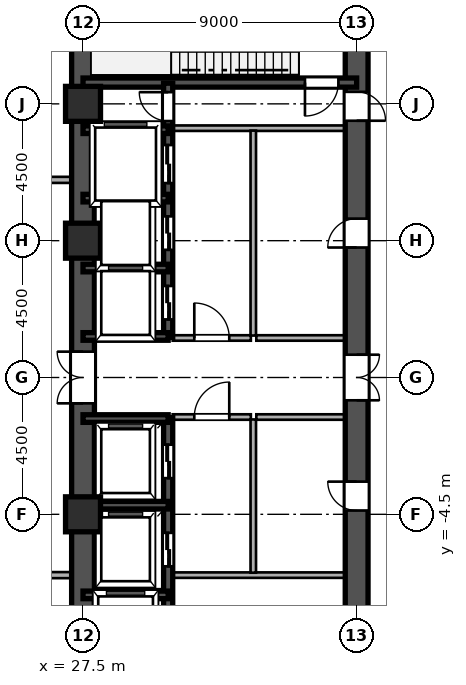
"""IFC4 building model, lengths in metres.
Left out: names, types, materials, properties, quantities, classifications, styles, units other than length and angle.
Written with IfcOpenShell. Run it as: python <this file> out.ifc"""

import sys

from ifc_helpers import new_model, si_unit, direction, frame, frame_2d, origin, origin_2d, place, context, subcontext, project, spatial, rectangle, hollow_rectangle, extrude, source, transform, mapped, element, fill, save


model = new_model("IFC4")
c1 = context("Model", 3, precision=1e-05, world=origin(), true_north=direction((0.0, 1.0)))
c2 = subcontext(c1, "Body", "Model", "MODEL_VIEW")
j1 = project(units=[si_unit("LENGTHUNIT", "METRE"), si_unit("PLANEANGLEUNIT", "RADIAN")], contexts=[c1])
p1 = place(None, origin())
s1 = spatial("IfcSite", under=j1, at=p1, CompositionType="ELEMENT")
p2 = place(p1, origin())
s2 = spatial("IfcBuilding", under=s1, at=p2, CompositionType="ELEMENT")
p3 = place(p2, origin())
s3 = spatial("IfcBuildingStorey", under=s2, at=p3, CompositionType="ELEMENT", Elevation=0.0)
m1 = source(origin(), c2, "Body", "SweptSolid", [
    extrude(hollow_rectangle(XDim=1.15, YDim=1.15, WallThickness=0.048, at=origin_2d()), origin(), (0.0, 0.0, 1.0), 5.4),
])
for number, where, z_axis, x_axis in (
    (1, (27.5, -4.5, 0.0), (0.0, 0.0, 1.0), (1.0, 0.0, 0.0)),
    (2, (27.5, 4.5, 0.0), (0.0, 0.0, 1.0), (1.0, 0.0, 0.0)),
    (3, (27.5, 9.0, 0.0), (0.0, 0.0, 1.0), (1.0, 0.0, 0.0)),
):
    element("IfcColumn", number, at=place(p3, frame(where, z_axis=z_axis, x_axis=x_axis)), inside=s3, PredefinedType="COLUMN", context=c2, shape_type="MappedRepresentation", body=[
        mapped(m1, transform((0.0, 0.0, 0.0), scale=1.0)),
    ])
for number, where, z_axis, x_axis in (
    (4, (27.5, -13.5, 0.0), (0.0, 0.0, 1.0), (0.0, 1.0, 0.0)),
    (5, (27.5, 1.3, 0.0), (0.0, 0.0, 1.0), (0.0, 1.0, 0.0)),
):
    element("IfcWall", number, at=place(p3, frame(where, z_axis=z_axis, x_axis=x_axis)), inside=s3, PredefinedType="SHEAR", context=c2, shape_type="SweptSolid", body=[
        extrude(rectangle(XDim=12.2, YDim=0.75, at=frame_2d((6.1, 0.0))), origin(), (0.0, 0.0, 1.0), 5.12),
    ])
p4 = place(p3, frame((27.5, -1.3, 0.0), z_axis=(0.0, 0.0, 1.0), x_axis=(0.0, 1.0, 0.0)))
e6 = element("IfcWall", 6, at=p4, inside=s3, PredefinedType="SHEAR", context=c2, shape_type="SweptSolid", body=[
    extrude(rectangle(XDim=2.6, YDim=0.75, at=frame_2d((1.3, 0.0))), origin(), (0.0, 0.0, 1.0), 5.12),
])
p5 = place(p4, frame((0.45, 0.0, 0.0)))
e7 = element("IfcOpeningElement", 7, at=p5, cuts=e6, PredefinedType="OPENING", context=c2, shape_type="SweptSolid", body=[
    extrude(rectangle(XDim=1.7, YDim=2.35, at=frame_2d((0.85, 1.175))), frame((0.0, 0.385, 0.0), z_axis=(0.0, -1.0, 0.0), x_axis=(1.0, 0.0, 0.0)), (0.0, 0.0, 1.0), 0.77),
])
p6 = place(p3, frame((36.5, -13.65, 0.0), z_axis=(0.0, 0.0, 1.0), x_axis=(0.0, 1.0, 0.0)))
e8 = element("IfcWall", 8, at=p6, inside=s3, PredefinedType="SHEAR", context=c2, shape_type="SweptSolid", body=[
    extrude(rectangle(XDim=7.15, YDim=0.75, at=frame_2d((3.575, 0.0))), origin(), (0.0, 0.0, 1.0), 5.12),
])
p7 = place(p6, frame((4.675, 0.0, 0.0)))
e9 = element("IfcOpeningElement", 9, at=p7, cuts=e8, PredefinedType="OPENING", context=c2, shape_type="SweptSolid", body=[
    extrude(rectangle(XDim=1.15, YDim=2.2, at=frame_2d((0.575, 1.1))), frame((0.0, 0.385, 0.0), z_axis=(0.0, -1.0, 0.0), x_axis=(1.0, 0.0, 0.0)), (0.0, 0.0, 1.0), 0.77),
])
p8 = place(p3, frame((36.5, -1.3, 0.0), z_axis=(0.0, 0.0, 1.0), x_axis=(0.0, 1.0, 0.0)))
e10 = element("IfcWall", 10, at=p8, inside=s3, PredefinedType="SHEAR", context=c2, shape_type="SweptSolid", body=[
    extrude(rectangle(XDim=2.6, YDim=0.75, at=frame_2d((1.3, 0.0))), origin(), (0.0, 0.0, 1.0), 5.12),
])
p9 = place(p8, frame((0.55, 0.0, 0.0)))
e11 = element("IfcOpeningElement", 11, at=p9, cuts=e10, PredefinedType="OPENING", context=c2, shape_type="SweptSolid", body=[
    extrude(rectangle(XDim=1.5, YDim=2.3, at=frame_2d((0.75, 1.15))), frame((0.0, 0.385, 0.0), z_axis=(0.0, -1.0, 0.0), x_axis=(1.0, 0.0, 0.0)), (0.0, 0.0, 1.0), 0.77),
])
p10 = place(p3, frame((36.5, 8.2, 0.0), z_axis=(0.0, 0.0, 1.0), x_axis=(0.0, 1.0, 0.0)))
e12 = element("IfcWall", 12, at=p10, inside=s3, PredefinedType="SHEAR", context=c2, shape_type="SweptSolid", body=[
    extrude(rectangle(XDim=5.45, YDim=0.75, at=frame_2d((2.725, 0.0))), origin(), (0.0, 0.0, 1.0), 5.12),
])
p11 = place(p10, frame((0.245, 0.0, 0.0)))
e13 = element("IfcOpeningElement", 13, at=p11, cuts=e12, PredefinedType="OPENING", context=c2, shape_type="SweptSolid", body=[
    extrude(rectangle(XDim=0.95, YDim=2.15, at=frame_2d((0.475, 1.075))), frame((0.0, 0.385, 0.0), z_axis=(0.0, -1.0, 0.0), x_axis=(1.0, 0.0, 0.0)), (0.0, 0.0, 1.0), 0.77),
])
p12 = place(p3, frame((36.5, -6.5, 0.0), z_axis=(0.0, 0.0, 1.0), x_axis=(0.0, 1.0, 0.0)))
e14 = element("IfcWall", 14, at=p12, inside=s3, PredefinedType="SHEAR", context=c2, shape_type="SweptSolid", body=[
    extrude(rectangle(XDim=5.2, YDim=0.75, at=frame_2d((2.6, 0.0))), origin(), (0.0, 0.0, 1.0), 5.12),
])
p13 = place(p12, frame((2.125, 0.0, 0.0)))
e15 = element("IfcOpeningElement", 15, at=p13, cuts=e14, PredefinedType="OPENING", context=c2, shape_type="SweptSolid", body=[
    extrude(rectangle(XDim=0.95, YDim=2.15, at=frame_2d((0.475, 1.075))), frame((0.0, 0.385, 0.0), z_axis=(0.0, -1.0, 0.0), x_axis=(1.0, 0.0, 0.0)), (0.0, 0.0, 1.0), 0.77),
])
p14 = place(p3, frame((36.5, 1.3, 0.0), z_axis=(0.0, 0.0, 1.0), x_axis=(0.0, 1.0, 0.0)))
e16 = element("IfcWall", 16, at=p14, inside=s3, PredefinedType="SHEAR", context=c2, shape_type="SweptSolid", body=[
    extrude(rectangle(XDim=6.9, YDim=0.75, at=frame_2d((3.45, 0.0))), origin(), (0.0, 0.0, 1.0), 5.12),
])
p15 = place(p14, frame((2.975, 0.0, 0.0)))
e17 = element("IfcOpeningElement", 17, at=p15, cuts=e16, PredefinedType="OPENING", context=c2, shape_type="SweptSolid", body=[
    extrude(rectangle(XDim=0.95, YDim=2.15, at=frame_2d((0.475, 1.075))), frame((0.0, 0.385, 0.0), z_axis=(0.0, -1.0, 0.0), x_axis=(1.0, 0.0, 0.0)), (0.0, 0.0, 1.0), 0.77),
])
p16 = place(p3, frame((27.5, 9.7, 0.0), z_axis=(0.0, 0.0, 1.0), x_axis=(1.0, 0.0, 0.0)))
e18 = element("IfcWall", 18, at=p16, inside=s3, PredefinedType="SHEAR", context=c2, shape_type="SweptSolid", body=[
    extrude(rectangle(XDim=9.0, YDim=0.3, at=frame_2d((4.5, 0.0))), origin(), (0.0, 0.0, 1.0), 5.12),
])
p17 = place(p16, frame((7.3, 0.0, 0.0)))
e19 = element("IfcOpeningElement", 19, at=p17, cuts=e18, PredefinedType="OPENING", context=c2, shape_type="SweptSolid", body=[
    extrude(rectangle(XDim=1.1, YDim=2.2, at=frame_2d((0.55, 1.1))), frame((0.0, 0.16, 0.0), z_axis=(0.0, -1.0, 0.0), x_axis=(1.0, 0.0, 0.0)), (0.0, 0.0, 1.0), 0.32),
])
for number, where, z_axis, x_axis in (
    (20, (27.5, -7.15, 0.0), (0.0, 0.0, 1.0), (1.0, 0.0, 0.0)),
    (21, (27.5, -4.2, 0.0), (0.0, 0.0, 1.0), (1.0, 0.0, 0.0)),
    (22, (27.5, -1.35, 0.0), (0.0, 0.0, 1.0), (1.0, 0.0, 0.0)),
    (23, (27.5, 1.35, 0.0), (0.0, 0.0, 1.0), (1.0, 0.0, 0.0)),
    (24, (27.5, 3.6, 0.0), (0.0, 0.0, 1.0), (1.0, 0.0, 0.0)),
    (25, (27.5, 5.9, 0.0), (0.0, 0.0, 1.0), (1.0, 0.0, 0.0)),
    (26, (27.5, 8.15, 0.0), (0.0, 0.0, 1.0), (1.0, 0.0, 0.0)),
):
    element("IfcWall", number, at=place(p3, frame(where, z_axis=z_axis, x_axis=x_axis)), inside=s3, PredefinedType="SHEAR", context=c2, shape_type="SweptSolid", body=[
        extrude(rectangle(XDim=2.8, YDim=0.25, at=frame_2d((1.4, 0.0))), origin(), (0.0, 0.0, 1.0), 5.12),
    ])
p18 = place(p3, frame((30.3, -9.68, 0.0), z_axis=(0.0, 0.0, 1.0), x_axis=(0.0, 1.0, 0.0)))
e27 = element("IfcWall", 27, at=p18, inside=s3, PredefinedType="SHEAR", context=c2, shape_type="SweptSolid", body=[
    extrude(rectangle(XDim=2.56, YDim=0.3, at=frame_2d((1.28, 0.0))), origin(), (0.0, 0.0, 1.0), 5.12),
])
p19 = place(p18, frame((0.68, 0.0, 0.0)))
e28 = element("IfcOpeningElement", 28, at=p19, cuts=e27, PredefinedType="OPENING", context=c2, shape_type="SweptSolid", body=[
    extrude(rectangle(XDim=1.2, YDim=2.25, at=frame_2d((0.6, 1.125))), frame((0.0, 0.16, 0.0), z_axis=(0.0, -1.0, 0.0), x_axis=(1.0, 0.0, 0.0)), (0.0, 0.0, 1.0), 0.32),
])
p20 = place(p3, frame((30.3, -7.12, 0.0), z_axis=(0.0, 0.0, 1.0), x_axis=(0.0, 1.0, 0.0)))
e29 = element("IfcWall", 29, at=p20, inside=s3, PredefinedType="SHEAR", context=c2, shape_type="SweptSolid", body=[
    extrude(rectangle(XDim=2.92, YDim=0.3, at=frame_2d((1.46, 0.0))), origin(), (0.0, 0.0, 1.0), 5.12),
])
p21 = place(p20, frame((0.91, 0.0, 0.0)))
e30 = element("IfcOpeningElement", 30, at=p21, cuts=e29, PredefinedType="OPENING", context=c2, shape_type="SweptSolid", body=[
    extrude(rectangle(XDim=1.1, YDim=2.2, at=frame_2d((0.55, 1.1))), frame((0.0, 0.16, 0.0), z_axis=(0.0, -1.0, 0.0), x_axis=(1.0, 0.0, 0.0)), (0.0, 0.0, 1.0), 0.32),
])
p22 = place(p3, frame((30.3, -4.2, 0.0), z_axis=(0.0, 0.0, 1.0), x_axis=(0.0, 1.0, 0.0)))
e31 = element("IfcWall", 31, at=p22, inside=s3, PredefinedType="SHEAR", context=c2, shape_type="SweptSolid", body=[
    extrude(rectangle(XDim=2.88, YDim=0.3, at=frame_2d((1.44, 0.0))), origin(), (0.0, 0.0, 1.0), 5.12),
])
p23 = place(p22, frame((0.89, 0.0, 0.0)))
e32 = element("IfcOpeningElement", 32, at=p23, cuts=e31, PredefinedType="OPENING", context=c2, shape_type="SweptSolid", body=[
    extrude(rectangle(XDim=1.1, YDim=2.2, at=frame_2d((0.55, 1.1))), frame((0.0, 0.16, 0.0), z_axis=(0.0, -1.0, 0.0), x_axis=(1.0, 0.0, 0.0)), (0.0, 0.0, 1.0), 0.32),
])
p24 = place(p3, frame((30.3, 1.32, 0.0), z_axis=(0.0, 0.0, 1.0), x_axis=(0.0, 1.0, 0.0)))
e33 = element("IfcWall", 33, at=p24, inside=s3, PredefinedType="SHEAR", context=c2, shape_type="SweptSolid", body=[
    extrude(rectangle(XDim=2.28, YDim=0.3, at=frame_2d((1.14, 0.0))), origin(), (0.0, 0.0, 1.0), 5.12),
])
p25 = place(p24, frame((0.59, 0.0, 0.0)))
e34 = element("IfcOpeningElement", 34, at=p25, cuts=e33, PredefinedType="OPENING", context=c2, shape_type="SweptSolid", body=[
    extrude(rectangle(XDim=1.1, YDim=2.2, at=frame_2d((0.55, 1.1))), frame((0.0, 0.16, 0.0), z_axis=(0.0, -1.0, 0.0), x_axis=(1.0, 0.0, 0.0)), (0.0, 0.0, 1.0), 0.32),
])
p26 = place(p3, frame((30.3, 3.6, 0.0), z_axis=(0.0, 0.0, 1.0), x_axis=(0.0, 1.0, 0.0)))
e35 = element("IfcWall", 35, at=p26, inside=s3, PredefinedType="SHEAR", context=c2, shape_type="SweptSolid", body=[
    extrude(rectangle(XDim=2.3, YDim=0.3, at=frame_2d((1.15, 0.0))), origin(), (0.0, 0.0, 1.0), 5.12),
])
p27 = place(p26, frame((0.6, 0.0, 0.0)))
e36 = element("IfcOpeningElement", 36, at=p27, cuts=e35, PredefinedType="OPENING", context=c2, shape_type="SweptSolid", body=[
    extrude(rectangle(XDim=1.1, YDim=2.2, at=frame_2d((0.55, 1.1))), frame((0.0, 0.16, 0.0), z_axis=(0.0, -1.0, 0.0), x_axis=(1.0, 0.0, 0.0)), (0.0, 0.0, 1.0), 0.32),
])
p28 = place(p3, frame((30.3, 5.9, 0.0), z_axis=(0.0, 0.0, 1.0), x_axis=(0.0, 1.0, 0.0)))
e37 = element("IfcWall", 37, at=p28, inside=s3, PredefinedType="SHEAR", context=c2, shape_type="SweptSolid", body=[
    extrude(rectangle(XDim=2.25, YDim=0.3, at=frame_2d((1.125, 0.0))), origin(), (0.0, 0.0, 1.0), 5.12),
])
p29 = place(p28, frame((0.495, 0.0, 0.0)))
e38 = element("IfcOpeningElement", 38, at=p29, cuts=e37, PredefinedType="OPENING", context=c2, shape_type="SweptSolid", body=[
    extrude(rectangle(XDim=1.25, YDim=2.3, at=frame_2d((0.625, 1.15))), frame((0.0, 0.16, 0.0), z_axis=(0.0, -1.0, 0.0), x_axis=(1.0, 0.0, 0.0)), (0.0, 0.0, 1.0), 0.32),
])
p30 = place(p3, frame((30.3, 8.15, 0.0), z_axis=(0.0, 0.0, 1.0), x_axis=(0.0, 1.0, 0.0)))
e39 = element("IfcWall", 39, at=p30, inside=s3, PredefinedType="SHEAR", context=c2, shape_type="SweptSolid", body=[
    extrude(rectangle(XDim=1.53, YDim=0.3, at=frame_2d((0.765, 0.0))), origin(), (0.0, 0.0, 1.0), 5.12),
])
p31 = place(p30, frame((0.285, 0.0, 0.0)))
e40 = element("IfcOpeningElement", 40, at=p31, cuts=e39, PredefinedType="OPENING", context=c2, shape_type="SweptSolid", body=[
    extrude(rectangle(XDim=0.95, YDim=2.15, at=frame_2d((0.475, 1.075))), frame((0.0, 0.16, 0.0), z_axis=(0.0, -1.0, 0.0), x_axis=(1.0, 0.0, 0.0)), (0.0, 0.0, 1.0), 0.32),
])
for number, where, z_axis, x_axis in (
    (41, (30.45, -6.5, 0.0), (0.0, 0.0, 1.0), (1.0, 0.0, 0.0)),
    (42, (30.45, 8.2, 0.0), (0.0, 0.0, 1.0), (1.0, 0.0, 0.0)),
):
    element("IfcWall", number, at=place(p3, frame(where, z_axis=z_axis, x_axis=x_axis)), inside=s3, PredefinedType="PARTITIONING", context=c2, shape_type="SweptSolid", body=[
        extrude(rectangle(XDim=5.7, YDim=0.18, at=frame_2d((2.85, 0.0))), origin(), (0.0, 0.0, 1.0), 5.12),
    ])
p32 = place(p3, frame((33.1, -6.42, 0.0), z_axis=(0.0, 0.0, 1.0), x_axis=(0.0, 1.0, 0.0)))
e43 = element("IfcWall", 43, at=p32, inside=s3, PredefinedType="PARTITIONING", context=c2, shape_type="SweptSolid", body=[
    extrude(rectangle(XDim=5.04, YDim=0.18, at=frame_2d((2.52, 0.0))), origin(), (0.0, 0.0, 1.0), 5.12),
])
p33 = place(p3, frame((33.1, 1.38, 0.0), z_axis=(0.0, 0.0, 1.0), x_axis=(0.0, 1.0, 0.0)))
e44 = element("IfcWall", 44, at=p33, inside=s3, PredefinedType="PARTITIONING", context=c2, shape_type="SweptSolid", body=[
    extrude(rectangle(XDim=6.74, YDim=0.18, at=frame_2d((3.37, 0.0))), origin(), (0.0, 0.0, 1.0), 5.12),
])
p34 = place(p3, frame((30.45, -1.3, 0.0), z_axis=(0.0, 0.0, 1.0), x_axis=(1.0, 0.0, 0.0)))
e45 = element("IfcWall", 45, at=p34, inside=s3, PredefinedType="PARTITIONING", context=c2, shape_type="SweptSolid", body=[
    extrude(rectangle(XDim=2.57, YDim=0.18, at=frame_2d((1.285, 0.0))), origin(), (0.0, 0.0, 1.0), 5.12),
])
p35 = place(p34, frame((0.71, 0.0, 0.0)))
e46 = element("IfcOpeningElement", 46, at=p35, cuts=e45, PredefinedType="OPENING", context=c2, shape_type="SweptSolid", body=[
    extrude(rectangle(XDim=1.15, YDim=2.2, at=frame_2d((0.575, 1.1))), frame((0.0, 0.1, 0.0), z_axis=(0.0, -1.0, 0.0), x_axis=(1.0, 0.0, 0.0)), (0.0, 0.0, 1.0), 0.2),
])
p36 = place(p3, frame((30.45, 1.3, 0.0), z_axis=(0.0, 0.0, 1.0), x_axis=(1.0, 0.0, 0.0)))
e47 = element("IfcWall", 47, at=p36, inside=s3, PredefinedType="PARTITIONING", context=c2, shape_type="SweptSolid", body=[
    extrude(rectangle(XDim=2.57, YDim=0.18, at=frame_2d((1.285, 0.0))), origin(), (0.0, 0.0, 1.0), 5.12),
])
p37 = place(p36, frame((0.71, 0.0, 0.0)))
e48 = element("IfcOpeningElement", 48, at=p37, cuts=e47, PredefinedType="OPENING", context=c2, shape_type="SweptSolid", body=[
    extrude(rectangle(XDim=1.15, YDim=2.2, at=frame_2d((0.575, 1.1))), frame((0.0, 0.1, 0.0), z_axis=(0.0, -1.0, 0.0), x_axis=(1.0, 0.0, 0.0)), (0.0, 0.0, 1.0), 0.2),
])
for number, where, z_axis, x_axis in (
    (49, (33.2, -1.3, 0.0), (0.0, 0.0, 1.0), (1.0, 0.0, 0.0)),
    (50, (33.2, 1.3, 0.0), (0.0, 0.0, 1.0), (1.0, 0.0, 0.0)),
):
    element("IfcWall", number, at=place(p3, frame(where, z_axis=z_axis, x_axis=x_axis)), inside=s3, PredefinedType="PARTITIONING", context=c2, shape_type="SweptSolid", body=[
        extrude(rectangle(XDim=2.95, YDim=0.18, at=frame_2d((1.475, 0.0))), origin(), (0.0, 0.0, 1.0), 5.12),
    ])
p38 = place(p3, frame((-27.12, -6.5, 0.0), z_axis=(0.0, 0.0, 1.0), x_axis=(1.0, 0.0, 0.0)))
e51 = element("IfcWall", 51, at=p38, inside=s3, PredefinedType="PARTITIONING", context=c2, shape_type="SweptSolid", body=[
    extrude(rectangle(XDim=54.24, YDim=0.2, at=frame_2d((27.12, 0.0))), origin(), (0.0, 0.0, 1.0), 5.12),
])
p39 = place(p38, frame((5.145, 0.0, 0.0)))
e52 = element("IfcOpeningElement", 52, at=p39, cuts=e51, PredefinedType="OPENING", context=c2, shape_type="SweptSolid", body=[
    extrude(rectangle(XDim=0.95, YDim=2.15, at=frame_2d((0.475, 1.075))), frame((0.0, 0.11, 0.0), z_axis=(0.0, -1.0, 0.0), x_axis=(1.0, 0.0, 0.0)), (0.0, 0.0, 1.0), 0.22),
])
p40 = place(p38, frame((37.645, 0.0, 0.0)))
e53 = element("IfcOpeningElement", 53, at=p40, cuts=e51, PredefinedType="OPENING", context=c2, shape_type="SweptSolid", body=[
    extrude(rectangle(XDim=0.95, YDim=2.15, at=frame_2d((0.475, 1.075))), frame((0.0, 0.11, 0.0), z_axis=(0.0, -1.0, 0.0), x_axis=(1.0, 0.0, 0.0)), (0.0, 0.0, 1.0), 0.22),
])
p41 = place(p3, frame((-27.12, 6.5, 0.0), z_axis=(0.0, 0.0, 1.0), x_axis=(1.0, 0.0, 0.0)))
e54 = element("IfcWall", 54, at=p41, inside=s3, PredefinedType="PARTITIONING", context=c2, shape_type="SweptSolid", body=[
    extrude(rectangle(XDim=54.24, YDim=0.2, at=frame_2d((27.12, 0.0))), origin(), (0.0, 0.0, 1.0), 5.12),
])
p42 = place(p41, frame((4.045, 0.0, 0.0)))
e55 = element("IfcOpeningElement", 55, at=p42, cuts=e54, PredefinedType="OPENING", context=c2, shape_type="SweptSolid", body=[
    extrude(rectangle(XDim=1.15, YDim=2.2, at=frame_2d((0.575, 1.1))), frame((0.0, 0.11, 0.0), z_axis=(0.0, -1.0, 0.0), x_axis=(1.0, 0.0, 0.0)), (0.0, 0.0, 1.0), 0.22),
])
p43 = place(p41, frame((17.395, 0.0, 0.0)))
e56 = element("IfcOpeningElement", 56, at=p43, cuts=e54, PredefinedType="OPENING", context=c2, shape_type="SweptSolid", body=[
    extrude(rectangle(XDim=0.95, YDim=2.15, at=frame_2d((0.475, 1.075))), frame((0.0, 0.11, 0.0), z_axis=(0.0, -1.0, 0.0), x_axis=(1.0, 0.0, 0.0)), (0.0, 0.0, 1.0), 0.22),
])
p44 = place(p41, frame((47.33, 0.0, 0.0)))
e57 = element("IfcOpeningElement", 57, at=p44, cuts=e54, PredefinedType="OPENING", context=c2, shape_type="SweptSolid", body=[
    extrude(rectangle(XDim=0.88, YDim=2.1, at=frame_2d((0.44, 1.05))), frame((0.0, 0.11, 0.0), z_axis=(0.0, -1.0, 0.0), x_axis=(1.0, 0.0, 0.0)), (0.0, 0.0, 1.0), 0.22),
])
p45 = place(p41, frame((51.68, 0.0, 0.0)))
e58 = element("IfcOpeningElement", 58, at=p45, cuts=e54, PredefinedType="OPENING", context=c2, shape_type="SweptSolid", body=[
    extrude(rectangle(XDim=0.88, YDim=2.1, at=frame_2d((0.44, 1.05))), frame((0.0, 0.11, 0.0), z_axis=(0.0, -1.0, 0.0), x_axis=(1.0, 0.0, 0.0)), (0.0, 0.0, 1.0), 0.22),
])
m2 = source(origin(), c2, "Body", "SweptSolid", [
    extrude(rectangle(XDim=1.7, YDim=2.35, at=frame_2d((0.85, 1.175))), frame((0.0, 0.025, 0.0), z_axis=(0.0, -1.0, 0.0), x_axis=(1.0, 0.0, 0.0)), (0.0, 0.0, 1.0), 0.05),
])
p46 = place(p5, origin())
e59 = element("IfcDoor", 59, at=p46, inside=s3, OperationType="DOUBLE_SWING_LEFT", PredefinedType="DOOR", context=c2, shape_type="MappedRepresentation", body=[
    mapped(m2, transform((0.0, 0.0, 0.0), scale=1.0)),
])
fill(e7, e59)
m3 = source(origin(), c2, "Body", "SweptSolid", [
    extrude(rectangle(XDim=1.5, YDim=2.3, at=frame_2d((0.75, 1.15))), frame((0.0, 0.025, 0.0), z_axis=(0.0, -1.0, 0.0), x_axis=(1.0, 0.0, 0.0)), (0.0, 0.0, 1.0), 0.05),
])
p47 = place(p9, frame((1.5, 0.0, 0.0), z_axis=(0.0, 0.0, 1.0), x_axis=(-1.0, 0.0, 0.0)))
e60 = element("IfcDoor", 60, at=p47, inside=s3, OperationType="DOUBLE_SWING_LEFT", PredefinedType="DOOR", context=c2, shape_type="MappedRepresentation", body=[
    mapped(m3, transform((0.0, 0.0, 0.0), scale=1.0)),
])
fill(e11, e60)
m4 = source(origin(), c2, "Body", "SweptSolid", [
    extrude(rectangle(XDim=0.95, YDim=2.15, at=frame_2d((0.475, 1.075))), frame((0.0, 0.025, 0.0), z_axis=(0.0, -1.0, 0.0), x_axis=(1.0, 0.0, 0.0)), (0.0, 0.0, 1.0), 0.05),
])
p48 = place(p11, frame((0.95, 0.0, 0.0), z_axis=(0.0, 0.0, 1.0), x_axis=(-1.0, 0.0, 0.0)))
e61 = element("IfcDoor", 61, at=p48, inside=s3, OperationType="SINGLE_SWING_LEFT", PredefinedType="DOOR", context=c2, shape_type="MappedRepresentation", body=[
    mapped(m4, transform((0.0, 0.0, 0.0), scale=1.0)),
])
fill(e13, e61)
p49 = place(p13, origin())
e62 = element("IfcDoor", 62, at=p49, inside=s3, OperationType="SINGLE_SWING_RIGHT", PredefinedType="DOOR", context=c2, shape_type="MappedRepresentation", body=[
    mapped(m4, transform((0.0, 0.0, 0.0), scale=1.0)),
])
fill(e15, e62)
p50 = place(p15, origin())
e63 = element("IfcDoor", 63, at=p50, inside=s3, OperationType="SINGLE_SWING_LEFT", PredefinedType="DOOR", context=c2, shape_type="MappedRepresentation", body=[
    mapped(m4, transform((0.0, 0.0, 0.0), scale=1.0)),
])
fill(e17, e63)
m5 = source(origin(), c2, "Body", "SweptSolid", [
    extrude(rectangle(XDim=1.1, YDim=2.2, at=frame_2d((0.55, 1.1))), frame((0.0, 0.025, 0.0), z_axis=(0.0, -1.0, 0.0), x_axis=(1.0, 0.0, 0.0)), (0.0, 0.0, 1.0), 0.05),
])
p51 = place(p17, frame((1.1, 0.0, 0.0), z_axis=(0.0, 0.0, 1.0), x_axis=(-1.0, 0.0, 0.0)))
e64 = element("IfcDoor", 64, at=p51, inside=s3, OperationType="SINGLE_SWING_LEFT", PredefinedType="DOOR", context=c2, shape_type="MappedRepresentation", body=[
    mapped(m5, transform((0.0, 0.0, 0.0), scale=1.0)),
])
fill(e19, e64)
m6 = source(origin(), c2, "Body", "SweptSolid", [
    extrude(rectangle(XDim=1.1, YDim=2.2, at=frame_2d((0.55, 1.1))), frame((0.0, 0.025, 0.0), z_axis=(0.0, -1.0, 0.0), x_axis=(1.0, 0.0, 0.0)), (0.0, 0.0, 1.0), 0.05),
])
p52 = place(p21, origin())
e65 = element("IfcDoor", 65, at=p52, inside=s3, OperationType="DOUBLE_DOOR_SLIDING", PredefinedType="DOOR", context=c2, shape_type="MappedRepresentation", body=[
    mapped(m6, transform((0.0, 0.0, 0.0), scale=1.0)),
])
fill(e30, e65)
p53 = place(p23, origin())
e66 = element("IfcDoor", 66, at=p53, inside=s3, OperationType="DOUBLE_DOOR_SLIDING", PredefinedType="DOOR", context=c2, shape_type="MappedRepresentation", body=[
    mapped(m6, transform((0.0, 0.0, 0.0), scale=1.0)),
])
fill(e32, e66)
p54 = place(p25, origin())
e67 = element("IfcDoor", 67, at=p54, inside=s3, OperationType="DOUBLE_DOOR_SLIDING", PredefinedType="DOOR", context=c2, shape_type="MappedRepresentation", body=[
    mapped(m6, transform((0.0, 0.0, 0.0), scale=1.0)),
])
fill(e34, e67)
p55 = place(p27, origin())
e68 = element("IfcDoor", 68, at=p55, inside=s3, OperationType="DOUBLE_DOOR_SLIDING", PredefinedType="DOOR", context=c2, shape_type="MappedRepresentation", body=[
    mapped(m6, transform((0.0, 0.0, 0.0), scale=1.0)),
])
fill(e36, e68)
m7 = source(origin(), c2, "Body", "SweptSolid", [
    extrude(rectangle(XDim=1.25, YDim=2.3, at=frame_2d((0.625, 1.15))), frame((0.0, 0.025, 0.0), z_axis=(0.0, -1.0, 0.0), x_axis=(1.0, 0.0, 0.0)), (0.0, 0.0, 1.0), 0.05),
])
p56 = place(p29, origin())
e69 = element("IfcDoor", 69, at=p56, inside=s3, OperationType="DOUBLE_DOOR_SLIDING", PredefinedType="DOOR", context=c2, shape_type="MappedRepresentation", body=[
    mapped(m7, transform((0.0, 0.0, 0.0), scale=1.0)),
])
fill(e38, e69)
p57 = place(p31, origin())
e70 = element("IfcDoor", 70, at=p57, inside=s3, OperationType="SINGLE_SWING_RIGHT", PredefinedType="DOOR", context=c2, shape_type="MappedRepresentation", body=[
    mapped(m4, transform((0.0, 0.0, 0.0), scale=1.0)),
])
fill(e40, e70)
m8 = source(origin(), c2, "Body", "SweptSolid", [
    extrude(rectangle(XDim=1.15, YDim=2.2, at=frame_2d((0.575, 1.1))), frame((0.0, 0.025, 0.0), z_axis=(0.0, -1.0, 0.0), x_axis=(1.0, 0.0, 0.0)), (0.0, 0.0, 1.0), 0.05),
])
p58 = place(p35, origin())
e71 = element("IfcDoor", 71, at=p58, inside=s3, OperationType="SINGLE_SWING_RIGHT", PredefinedType="DOOR", context=c2, shape_type="MappedRepresentation", body=[
    mapped(m8, transform((0.0, 0.0, 0.0), scale=1.0)),
])
fill(e46, e71)
p59 = place(p37, origin())
e72 = element("IfcDoor", 72, at=p59, inside=s3, OperationType="SINGLE_SWING_LEFT", PredefinedType="DOOR", context=c2, shape_type="MappedRepresentation", body=[
    mapped(m8, transform((0.0, 0.0, 0.0), scale=1.0)),
])
fill(e48, e72)
save(model, sys.argv[1])
